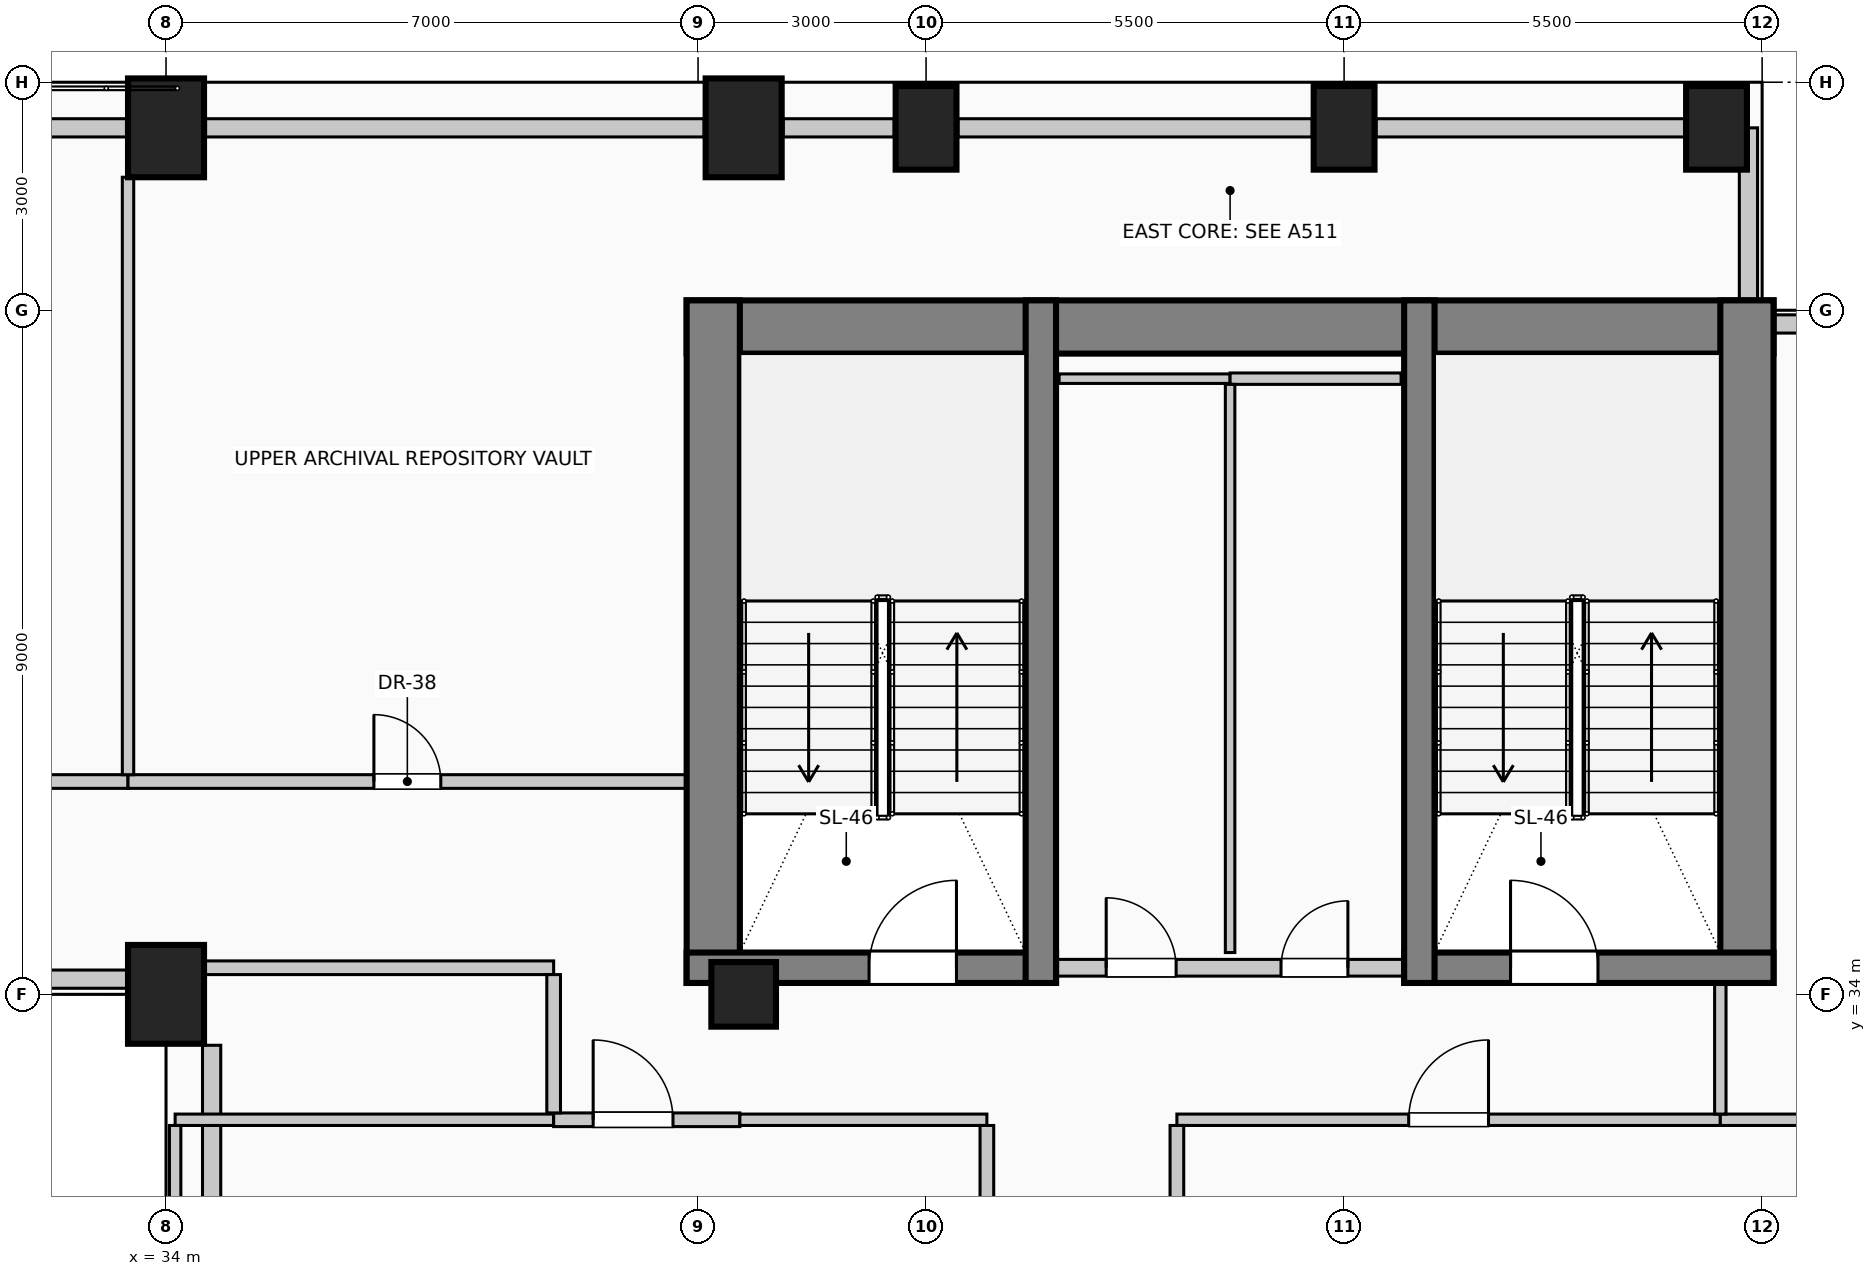
"""IFC4 building model, lengths in metres.
Left out: names, types, materials, properties, quantities, classifications, styles, units other than length and angle.
Written with IfcOpenShell. Run it as: python <this file> out.ifc"""

import sys

from ifc_helpers import new_model, si_unit, direction, frame, frame_2d, origin, origin_2d, place, context, subcontext, project, spatial, rectangle, circle, extrude, element, fill, save


model = new_model("IFC4")
c1 = context("Model", 3, precision=1e-05, world=origin(), true_north=direction((0.0, 1.0)))
c2 = subcontext(c1, "Body", "Model", "MODEL_VIEW")
j1 = project(units=[si_unit("LENGTHUNIT", "METRE"), si_unit("PLANEANGLEUNIT", "RADIAN")], contexts=[c1])
p1 = place(None, origin())
s1 = spatial("IfcSite", under=j1, at=p1, CompositionType="ELEMENT")
p2 = place(p1, origin())
s2 = spatial("IfcBuilding", under=s1, at=p2, CompositionType="ELEMENT")
p3 = place(p2, frame((0.0, 0.0, 198.6)))
s3 = spatial("IfcBuildingStorey", under=s2, at=p3, CompositionType="ELEMENT", Elevation=198.6)
p4 = place(p3, frame((40.85, 42.78, 0.0), z_axis=(0.0, 0.0, 1.0), x_axis=(1.0, 0.0, 0.0)))
e1 = element("IfcWall", 1, at=p4, inside=s3, PredefinedType="SHEAR", context=c2, shape_type="SweptSolid", body=[
    extrude(rectangle(XDim=14.3, YDim=0.7, at=frame_2d((7.15, 0.0))), origin(), (0.0, 0.0, 1.0), 4.0),
])
for number, where, z_axis, x_axis in (
    (2, (41.2, 34.15, 0.0), (0.0, 0.0, 1.0), (0.0, 1.0, 0.0)),
    (3, (54.8, 34.15, 0.0), (0.0, 0.0, 1.0), (0.0, 1.0, 0.0)),
):
    element("IfcWall", number, at=place(p3, frame(where, z_axis=z_axis, x_axis=x_axis)), inside=s3, PredefinedType="SHEAR", context=c2, shape_type="SweptSolid", body=[
        extrude(rectangle(XDim=8.98, YDim=0.7, at=frame_2d((4.49, 0.0))), origin(), (0.0, 0.0, 1.0), 4.0),
    ])
p5 = place(p3, frame((40.85, 34.35, 0.0), z_axis=(0.0, 0.0, 1.0), x_axis=(1.0, 0.0, 0.0)))
e4 = element("IfcWall", 4, at=p5, inside=s3, PredefinedType="SHEAR", context=c2, shape_type="SweptSolid", body=[
    extrude(rectangle(XDim=4.86, YDim=0.4, at=frame_2d((2.43, 0.0))), origin(), (0.0, 0.0, 1.0), 4.0),
])
p6 = place(p5, frame((2.4, 0.0, 0.0)))
e5 = element("IfcOpeningElement", 5, at=p6, cuts=e4, PredefinedType="OPENING", context=c2, shape_type="SweptSolid", body=[
    extrude(rectangle(XDim=1.15, YDim=2.2, at=frame_2d((0.575, 1.1))), frame((0.0, 0.21, 0.0), z_axis=(0.0, -1.0, 0.0), x_axis=(1.0, 0.0, 0.0)), (0.0, 0.0, 1.0), 0.42),
])
p7 = place(p3, frame((45.51, 34.15, 0.0), z_axis=(0.0, 0.0, 1.0), x_axis=(0.0, 1.0, 0.0)))
e6 = element("IfcWall", 6, at=p7, inside=s3, PredefinedType="SHEAR", context=c2, shape_type="SweptSolid", body=[
    extrude(rectangle(XDim=8.98, YDim=0.4, at=frame_2d((4.49, 0.0))), origin(), (0.0, 0.0, 1.0), 4.0),
])
p8 = place(p3, frame((50.29, 34.35, 0.0), z_axis=(0.0, 0.0, 1.0), x_axis=(1.0, 0.0, 0.0)))
e7 = element("IfcWall", 7, at=p8, inside=s3, PredefinedType="SHEAR", context=c2, shape_type="SweptSolid", body=[
    extrude(rectangle(XDim=4.86, YDim=0.4, at=frame_2d((2.43, 0.0))), origin(), (0.0, 0.0, 1.0), 4.0),
])
p9 = place(p8, frame((1.4, 0.0, 0.0)))
e8 = element("IfcOpeningElement", 8, at=p9, cuts=e7, PredefinedType="OPENING", context=c2, shape_type="SweptSolid", body=[
    extrude(rectangle(XDim=1.15, YDim=2.2, at=frame_2d((0.575, 1.1))), frame((0.0, 0.21, 0.0), z_axis=(0.0, -1.0, 0.0), x_axis=(1.0, 0.0, 0.0)), (0.0, 0.0, 1.0), 0.42),
])
p10 = place(p3, frame((50.49, 34.15, 0.0), z_axis=(0.0, 0.0, 1.0), x_axis=(0.0, 1.0, 0.0)))
e9 = element("IfcWall", 9, at=p10, inside=s3, PredefinedType="SHEAR", context=c2, shape_type="SweptSolid", body=[
    extrude(rectangle(XDim=8.98, YDim=0.4, at=frame_2d((4.49, 0.0))), origin(), (0.0, 0.0, 1.0), 4.0),
])
for number, where, z_axis, x_axis in (
    (10, (34.0, 45.4, 0.0), (0.0, 0.0, 1.0), (1.0, 0.0, 0.0)),
    (11, (41.6, 45.4, 0.0), (0.0, 0.0, 1.0), (1.0, 0.0, 0.0)),
):
    element("IfcColumn", number, at=place(p3, frame(where, z_axis=z_axis, x_axis=x_axis)), inside=s3, PredefinedType="COLUMN", context=c2, shape_type="SweptSolid", body=[
        extrude(rectangle(XDim=1.0, YDim=1.3, at=origin_2d()), origin(), (0.0, 0.0, 1.0), 4.0),
    ])
for number, where, z_axis, x_axis in (
    (12, (44.0, 45.4, 0.0), (0.0, 0.0, 1.0), (1.0, 0.0, 0.0)),
    (13, (49.5, 45.4, 0.0), (0.0, 0.0, 1.0), (1.0, 0.0, 0.0)),
    (14, (54.4, 45.4, 0.0), (0.0, 0.0, 1.0), (1.0, 0.0, 0.0)),
):
    element("IfcColumn", number, at=place(p3, frame(where, z_axis=z_axis, x_axis=x_axis)), inside=s3, PredefinedType="COLUMN", context=c2, shape_type="SweptSolid", body=[
        extrude(rectangle(XDim=0.8, YDim=1.1, at=origin_2d()), origin(), (0.0, 0.0, 1.0), 4.0),
    ])
p11 = place(p3, frame((34.0, 34.0, 0.0), z_axis=(0.0, 0.0, 1.0), x_axis=(1.0, 0.0, 0.0)))
e15 = element("IfcColumn", 15, at=p11, inside=s3, PredefinedType="COLUMN", context=c2, shape_type="SweptSolid", body=[
    extrude(rectangle(XDim=1.0, YDim=1.3, at=origin_2d()), origin(), (0.0, 0.0, 1.0), 4.0),
])
p12 = place(p3, frame((41.6, 34.0, 0.0), z_axis=(0.0, 0.0, 1.0), x_axis=(1.0, 0.0, 0.0)))
e16 = element("IfcColumn", 16, at=p12, inside=s3, PredefinedType="COLUMN", context=c2, shape_type="SweptSolid", body=[
    extrude(circle(Radius=0.425, at=origin_2d()), origin(), (0.0, 0.0, 1.0), 4.0),
])
p13 = place(p3, frame((24.52, 45.4, 0.0), z_axis=(0.0, 0.0, 1.0), x_axis=(1.0, 0.0, 0.0)))
e17 = element("IfcWall", 17, at=p13, inside=s3, PredefinedType="SOLIDWALL", context=c2, shape_type="SweptSolid", body=[
    extrude(rectangle(XDim=8.96, YDim=0.24, at=frame_2d((4.48, 0.0))), origin(), (0.0, 0.0, 1.0), 0.75),
])
p14 = place(p3, frame((34.52, 45.4, 0.0), z_axis=(0.0, 0.0, 1.0), x_axis=(1.0, 0.0, 0.0)))
e18 = element("IfcWall", 18, at=p14, inside=s3, PredefinedType="SOLIDWALL", context=c2, shape_type="SweptSolid", body=[
    extrude(rectangle(XDim=6.56, YDim=0.24, at=frame_2d((3.28, 0.0))), origin(), (0.0, 0.0, 1.0), 3.0),
])
p15 = place(p3, frame((42.12, 45.4, 0.0), z_axis=(0.0, 0.0, 1.0), x_axis=(1.0, 0.0, 0.0)))
e19 = element("IfcWall", 19, at=p15, inside=s3, PredefinedType="SOLIDWALL", context=c2, shape_type="SweptSolid", body=[
    extrude(rectangle(XDim=1.46, YDim=0.24, at=frame_2d((0.73, 0.0))), origin(), (0.0, 0.0, 1.0), 3.0),
])
p16 = place(p3, frame((44.42, 45.4, 0.0), z_axis=(0.0, 0.0, 1.0), x_axis=(1.0, 0.0, 0.0)))
e20 = element("IfcWall", 20, at=p16, inside=s3, PredefinedType="SOLIDWALL", context=c2, shape_type="SweptSolid", body=[
    extrude(rectangle(XDim=4.66, YDim=0.24, at=frame_2d((2.33, 0.0))), origin(), (0.0, 0.0, 1.0), 3.0),
])
p17 = place(p3, frame((49.92, 45.4, 0.0), z_axis=(0.0, 0.0, 1.0), x_axis=(1.0, 0.0, 0.0)))
e21 = element("IfcWall", 21, at=p17, inside=s3, PredefinedType="SOLIDWALL", context=c2, shape_type="SweptSolid", body=[
    extrude(rectangle(XDim=4.06, YDim=0.24, at=frame_2d((2.03, 0.0))), origin(), (0.0, 0.0, 1.0), 3.0),
])
p18 = place(p3, frame((54.82, 45.4, 0.0), z_axis=(0.0, 0.0, 1.0), x_axis=(0.0, -1.0, 0.0)))
e22 = element("IfcWall", 22, at=p18, inside=s3, PredefinedType="SOLIDWALL", context=c2, shape_type="SweptSolid", body=[
    extrude(rectangle(XDim=2.265, YDim=0.24, at=frame_2d((1.132, 0.0))), origin(), (0.0, 0.0, 1.0), 3.75),
])
p19 = place(p3, frame((55.155, 42.82, 0.0), z_axis=(0.0, 0.0, 1.0), x_axis=(1.0, 0.0, 0.0)))
e23 = element("IfcWall", 23, at=p19, inside=s3, PredefinedType="SOLIDWALL", context=c2, shape_type="SweptSolid", body=[
    extrude(rectangle(XDim=2.245, YDim=0.24, at=frame_2d((1.123, 0.0))), origin(), (0.0, 0.0, 1.0), 3.75),
])
p20 = place(p3, frame((34.6, 26.67, 0.0), z_axis=(0.0, 0.0, 1.0), x_axis=(0.0, 1.0, 0.0)))
e24 = element("IfcWall", 24, at=p20, inside=s3, PredefinedType="SOLIDWALL", context=c2, shape_type="SweptSolid", body=[
    extrude(rectangle(XDim=6.66, YDim=0.24, at=frame_2d((3.33, 0.0))), origin(), (0.0, 0.0, 1.0), 3.75),
])
p21 = place(p3, frame((33.95, 34.2, 0.0), z_axis=(0.0, 0.0, 1.0), x_axis=(-1.0, 0.0, 0.0)))
e25 = element("IfcWall", 25, at=p21, inside=s3, PredefinedType="SOLIDWALL", context=c2, shape_type="SweptSolid", body=[
    extrude(rectangle(XDim=9.9, YDim=0.24, at=frame_2d((4.95, 0.0))), origin(), (0.0, 0.0, 1.0), 0.75),
])
p22 = place(p3, frame((45.72, 34.35, 0.0), z_axis=(0.0, 0.0, 1.0), x_axis=(1.0, 0.0, 0.0)))
e26 = element("IfcWall", 26, at=p22, inside=s3, PredefinedType="PARTITIONING", context=c2, shape_type="SweptSolid", body=[
    extrude(rectangle(XDim=4.56, YDim=0.22, at=frame_2d((2.28, 0.0))), origin(), (0.0, 0.0, 1.0), 3.75),
])
p23 = place(p22, frame((0.65, 0.0, 0.0)))
e27 = element("IfcOpeningElement", 27, at=p23, cuts=e26, PredefinedType="OPENING", context=c2, shape_type="SweptSolid", body=[
    extrude(rectangle(XDim=0.92, YDim=2.1, at=frame_2d((0.46, 1.05))), frame((0.0, 0.12, 0.0), z_axis=(0.0, -1.0, 0.0), x_axis=(1.0, 0.0, 0.0)), (0.0, 0.0, 1.0), 0.24),
])
p24 = place(p22, frame((2.95, 0.0, 0.0)))
e28 = element("IfcOpeningElement", 28, at=p24, cuts=e26, PredefinedType="OPENING", context=c2, shape_type="SweptSolid", body=[
    extrude(rectangle(XDim=0.88, YDim=2.1, at=frame_2d((0.44, 1.05))), frame((0.0, 0.12, 0.0), z_axis=(0.0, -1.0, 0.0), x_axis=(1.0, 0.0, 0.0)), (0.0, 0.0, 1.0), 0.24),
])
p25 = place(p3, frame((34.12, 32.35, 0.0), z_axis=(0.0, 0.0, 1.0), x_axis=(1.0, 0.0, 0.0)))
e29 = element("IfcWall", 29, at=p25, inside=s3, PredefinedType="PARTITIONING", context=c2, shape_type="SweptSolid", body=[
    extrude(rectangle(XDim=4.98, YDim=0.15, at=frame_2d((2.49, 0.0))), origin(), (0.0, 0.0, 1.0), 3.75),
])
p26 = place(p3, frame((39.1, 32.35, 0.0), z_axis=(0.0, 0.0, 1.0), x_axis=(1.0, 0.0, 0.0)))
e30 = element("IfcWall", 30, at=p26, inside=s3, PredefinedType="PARTITIONING", context=c2, shape_type="SweptSolid", body=[
    extrude(rectangle(XDim=2.45, YDim=0.18, at=frame_2d((1.225, 0.0))), origin(), (0.0, 0.0, 1.0), 3.75),
])
p27 = place(p26, frame((0.52, 0.0, 0.0)))
e31 = element("IfcOpeningElement", 31, at=p27, cuts=e30, PredefinedType="OPENING", context=c2, shape_type="SweptSolid", body=[
    extrude(rectangle(XDim=1.05, YDim=2.15, at=frame_2d((0.525, 1.075))), frame((0.0, 0.1, 0.0), z_axis=(0.0, -1.0, 0.0), x_axis=(1.0, 0.0, 0.0)), (0.0, 0.0, 1.0), 0.2),
])
p28 = place(p3, frame((41.55, 32.35, 0.0), z_axis=(0.0, 0.0, 1.0), x_axis=(1.0, 0.0, 0.0)))
e32 = element("IfcWall", 32, at=p28, inside=s3, PredefinedType="PARTITIONING", context=c2, shape_type="SweptSolid", body=[
    extrude(rectangle(XDim=3.25, YDim=0.15, at=frame_2d((1.625, 0.0))), origin(), (0.0, 0.0, 1.0), 3.75),
])
p29 = place(p3, frame((47.3, 32.35, 0.0), z_axis=(0.0, 0.0, 1.0), x_axis=(1.0, 0.0, 0.0)))
e33 = element("IfcWall", 33, at=p29, inside=s3, PredefinedType="PARTITIONING", context=c2, shape_type="SweptSolid", body=[
    extrude(rectangle(XDim=7.15, YDim=0.15, at=frame_2d((3.575, 0.0))), origin(), (0.0, 0.0, 1.0), 3.75),
])
p30 = place(p29, frame((3.05, 0.0, 0.0)))
e34 = element("IfcOpeningElement", 34, at=p30, cuts=e33, PredefinedType="OPENING", context=c2, shape_type="SweptSolid", body=[
    extrude(rectangle(XDim=1.05, YDim=2.15, at=frame_2d((0.525, 1.075))), frame((0.0, 0.085, 0.0), z_axis=(0.0, -1.0, 0.0), x_axis=(1.0, 0.0, 0.0)), (0.0, 0.0, 1.0), 0.17),
])
p31 = place(p3, frame((54.45, 32.35, 0.0), z_axis=(0.0, 0.0, 1.0), x_axis=(1.0, 0.0, 0.0)))
e35 = element("IfcWall", 35, at=p31, inside=s3, PredefinedType="PARTITIONING", context=c2, shape_type="SweptSolid", body=[
    extrude(rectangle(XDim=2.83, YDim=0.15, at=frame_2d((1.415, 0.0))), origin(), (0.0, 0.0, 1.0), 3.75),
])
p32 = place(p3, frame((34.5, 34.35, 0.0), z_axis=(0.0, 0.0, 1.0), x_axis=(1.0, 0.0, 0.0)))
e36 = element("IfcWall", 36, at=p32, inside=s3, PredefinedType="PARTITIONING", context=c2, shape_type="SweptSolid", body=[
    extrude(rectangle(XDim=4.6, YDim=0.18, at=frame_2d((2.3, 0.0))), origin(), (0.0, 0.0, 1.0), 3.75),
])
p33 = place(p3, frame((25.5, 36.8, 0.0), z_axis=(0.0, 0.0, 1.0), x_axis=(1.0, 0.0, 0.0)))
e37 = element("IfcWall", 37, at=p33, inside=s3, PredefinedType="PARTITIONING", context=c2, shape_type="SweptSolid", body=[
    extrude(rectangle(XDim=8.0, YDim=0.18, at=frame_2d((4.0, 0.0))), origin(), (0.0, 0.0, 1.0), 3.75),
])
p34 = place(p33, frame((3.475, 0.0, 0.0)))
e38 = element("IfcOpeningElement", 38, at=p34, cuts=e37, PredefinedType="OPENING", context=c2, shape_type="SweptSolid", body=[
    extrude(rectangle(XDim=1.05, YDim=2.15, at=frame_2d((0.525, 1.075))), frame((0.0, 0.1, 0.0), z_axis=(0.0, -1.0, 0.0), x_axis=(1.0, 0.0, 0.0)), (0.0, 0.0, 1.0), 0.2),
])
p35 = place(p3, frame((33.5, 36.8, 0.0), z_axis=(0.0, 0.0, 1.0), x_axis=(1.0, 0.0, 0.0)))
e39 = element("IfcWall", 39, at=p35, inside=s3, PredefinedType="PARTITIONING", context=c2, shape_type="SweptSolid", body=[
    extrude(rectangle(XDim=7.35, YDim=0.18, at=frame_2d((3.675, 0.0))), origin(), (0.0, 0.0, 1.0), 3.75),
])
p36 = place(p35, frame((3.235, 0.0, 0.0)))
e40 = element("IfcOpeningElement", 40, at=p36, cuts=e39, PredefinedType="OPENING", context=c2, shape_type="SweptSolid", body=[
    extrude(rectangle(XDim=0.88, YDim=2.1, at=frame_2d((0.44, 1.05))), frame((0.0, 0.1, 0.0), z_axis=(0.0, -1.0, 0.0), x_axis=(1.0, 0.0, 0.0)), (0.0, 0.0, 1.0), 0.2),
])
p37 = place(p3, frame((45.75, 42.1, 0.0), z_axis=(0.0, 0.0, 1.0), x_axis=(1.0, 0.0, 0.0)))
e41 = element("IfcWall", 41, at=p37, inside=s3, PredefinedType="PARTITIONING", context=c2, shape_type="SweptSolid", body=[
    extrude(rectangle(XDim=2.25, YDim=0.125, at=frame_2d((1.125, 0.0))), origin(), (0.0, 0.0, 1.0), 3.75),
])
p38 = place(p3, frame((48.0, 42.1, 0.0), z_axis=(0.0, 0.0, 1.0), x_axis=(1.0, 0.0, 0.0)))
e42 = element("IfcWall", 42, at=p38, inside=s3, PredefinedType="PARTITIONING", context=c2, shape_type="SweptSolid", body=[
    extrude(rectangle(XDim=2.25, YDim=0.15, at=frame_2d((1.125, 0.0))), origin(), (0.0, 0.0, 1.0), 3.75),
])
p39 = place(p3, frame((33.5, 36.89, 0.0), z_axis=(0.0, 0.0, 1.0), x_axis=(0.0, 1.0, 0.0)))
e43 = element("IfcWall", 43, at=p39, inside=s3, PredefinedType="PARTITIONING", context=c2, shape_type="SweptSolid", body=[
    extrude(rectangle(XDim=7.86, YDim=0.15, at=frame_2d((3.93, 0.0))), origin(), (0.0, 0.0, 1.0), 3.75),
])
p40 = place(p3, frame((34.12, 26.65, 0.0), z_axis=(0.0, 0.0, 1.0), x_axis=(0.0, 1.0, 0.0)))
e44 = element("IfcWall", 44, at=p40, inside=s3, PredefinedType="PARTITIONING", context=c2, shape_type="SweptSolid", body=[
    extrude(rectangle(XDim=5.625, YDim=0.15, at=frame_2d((2.812, 0.0))), origin(), (0.0, 0.0, 1.0), 3.145),
])
p41 = place(p3, frame((39.1, 32.44, 0.0), z_axis=(0.0, 0.0, 1.0), x_axis=(0.0, 1.0, 0.0)))
e45 = element("IfcWall", 45, at=p41, inside=s3, PredefinedType="PARTITIONING", context=c2, shape_type="SweptSolid", body=[
    extrude(rectangle(XDim=1.82, YDim=0.18, at=frame_2d((0.91, 0.0))), origin(), (0.0, 0.0, 1.0), 3.75),
])
p42 = place(p3, frame((44.8, 9.09, 0.0), z_axis=(0.0, 0.0, 1.0), x_axis=(0.0, 1.0, 0.0)))
e46 = element("IfcWall", 46, at=p42, inside=s3, PredefinedType="PARTITIONING", context=c2, shape_type="SweptSolid", body=[
    extrude(rectangle(XDim=23.185, YDim=0.18, at=frame_2d((11.592, 0.0))), origin(), (0.0, 0.0, 1.0), 3.75),
])
p43 = place(p3, frame((47.3, 24.075, 0.0), z_axis=(0.0, 0.0, 1.0), x_axis=(0.0, 1.0, 0.0)))
e47 = element("IfcWall", 47, at=p43, inside=s3, PredefinedType="PARTITIONING", context=c2, shape_type="SweptSolid", body=[
    extrude(rectangle(XDim=8.2, YDim=0.18, at=frame_2d((4.1, 0.0))), origin(), (0.0, 0.0, 1.0), 3.75),
])
p44 = place(p3, frame((48.0, 34.55, 0.0), z_axis=(0.0, 0.0, 1.0), x_axis=(0.0, 1.0, 0.0)))
e48 = element("IfcWall", 48, at=p44, inside=s3, PredefinedType="PARTITIONING", context=c2, shape_type="SweptSolid", body=[
    extrude(rectangle(XDim=7.475, YDim=0.125, at=frame_2d((3.737, 0.0))), origin(), (0.0, 0.0, 1.0), 3.75),
])
p45 = place(p3, frame((54.45, 32.425, 0.0), z_axis=(0.0, 0.0, 1.0), x_axis=(0.0, 1.0, 0.0)))
e49 = element("IfcWall", 49, at=p45, inside=s3, PredefinedType="PARTITIONING", context=c2, shape_type="SweptSolid", body=[
    extrude(rectangle(XDim=1.725, YDim=0.15, at=frame_2d((0.862, 0.0))), origin(), (0.0, 0.0, 1.0), 3.75),
])
p46 = place(p6, origin())
e50 = element("IfcDoor", 50, at=p46, inside=s3, OperationType="SINGLE_SWING_RIGHT", PredefinedType="DOOR", context=c2, shape_type="SweptSolid", body=[
    extrude(rectangle(XDim=1.15, YDim=2.2, at=frame_2d((0.575, 1.1))), frame((0.0, 0.025, 0.0), z_axis=(0.0, -1.0, 0.0), x_axis=(1.0, 0.0, 0.0)), (0.0, 0.0, 1.0), 0.05),
])
fill(e5, e50)
p47 = place(p23, origin())
e51 = element("IfcDoor", 51, at=p47, inside=s3, OperationType="SINGLE_SWING_LEFT", PredefinedType="DOOR", context=c2, shape_type="SweptSolid", body=[
    extrude(rectangle(XDim=0.92, YDim=2.1, at=frame_2d((0.46, 1.05))), frame((0.0, 0.025, 0.0), z_axis=(0.0, -1.0, 0.0), x_axis=(1.0, 0.0, 0.0)), (0.0, 0.0, 1.0), 0.05),
])
fill(e27, e51)
p48 = place(p24, origin())
e52 = element("IfcDoor", 52, at=p48, inside=s3, OperationType="SINGLE_SWING_RIGHT", PredefinedType="DOOR", context=c2, shape_type="SweptSolid", body=[
    extrude(rectangle(XDim=0.88, YDim=2.1, at=frame_2d((0.44, 1.05))), frame((0.0, 0.025, 0.0), z_axis=(0.0, -1.0, 0.0), x_axis=(1.0, 0.0, 0.0)), (0.0, 0.0, 1.0), 0.05),
])
fill(e28, e52)
p49 = place(p9, origin())
e53 = element("IfcDoor", 53, at=p49, inside=s3, OperationType="SINGLE_SWING_LEFT", PredefinedType="DOOR", context=c2, shape_type="SweptSolid", body=[
    extrude(rectangle(XDim=1.15, YDim=2.2, at=frame_2d((0.575, 1.1))), frame((0.0, 0.025, 0.0), z_axis=(0.0, -1.0, 0.0), x_axis=(1.0, 0.0, 0.0)), (0.0, 0.0, 1.0), 0.05),
])
fill(e8, e53)
p50 = place(p27, origin())
e54 = element("IfcDoor", 54, at=p50, inside=s3, OperationType="SINGLE_SWING_LEFT", PredefinedType="DOOR", context=c2, shape_type="SweptSolid", body=[
    extrude(rectangle(XDim=1.05, YDim=2.15, at=frame_2d((0.525, 1.075))), frame((0.0, 0.025, 0.0), z_axis=(0.0, -1.0, 0.0), x_axis=(1.0, 0.0, 0.0)), (0.0, 0.0, 1.0), 0.05),
])
fill(e31, e54)
p51 = place(p30, origin())
e55 = element("IfcDoor", 55, at=p51, inside=s3, OperationType="SINGLE_SWING_RIGHT", PredefinedType="DOOR", context=c2, shape_type="SweptSolid", body=[
    extrude(rectangle(XDim=1.05, YDim=2.15, at=frame_2d((0.525, 1.075))), frame((0.0, 0.025, 0.0), z_axis=(0.0, -1.0, 0.0), x_axis=(1.0, 0.0, 0.0)), (0.0, 0.0, 1.0), 0.05),
])
fill(e34, e55)
p52 = place(p36, origin())
e56 = element("IfcDoor", 56, at=p52, inside=s3, OperationType="SINGLE_SWING_LEFT", PredefinedType="DOOR", context=c2, shape_type="SweptSolid", body=[
    extrude(rectangle(XDim=0.88, YDim=2.1, at=frame_2d((0.44, 1.05))), frame((0.0, 0.025, 0.0), z_axis=(0.0, -1.0, 0.0), x_axis=(1.0, 0.0, 0.0)), (0.0, 0.0, 1.0), 0.05),
])
fill(e40, e56)
save(model, sys.argv[1])
